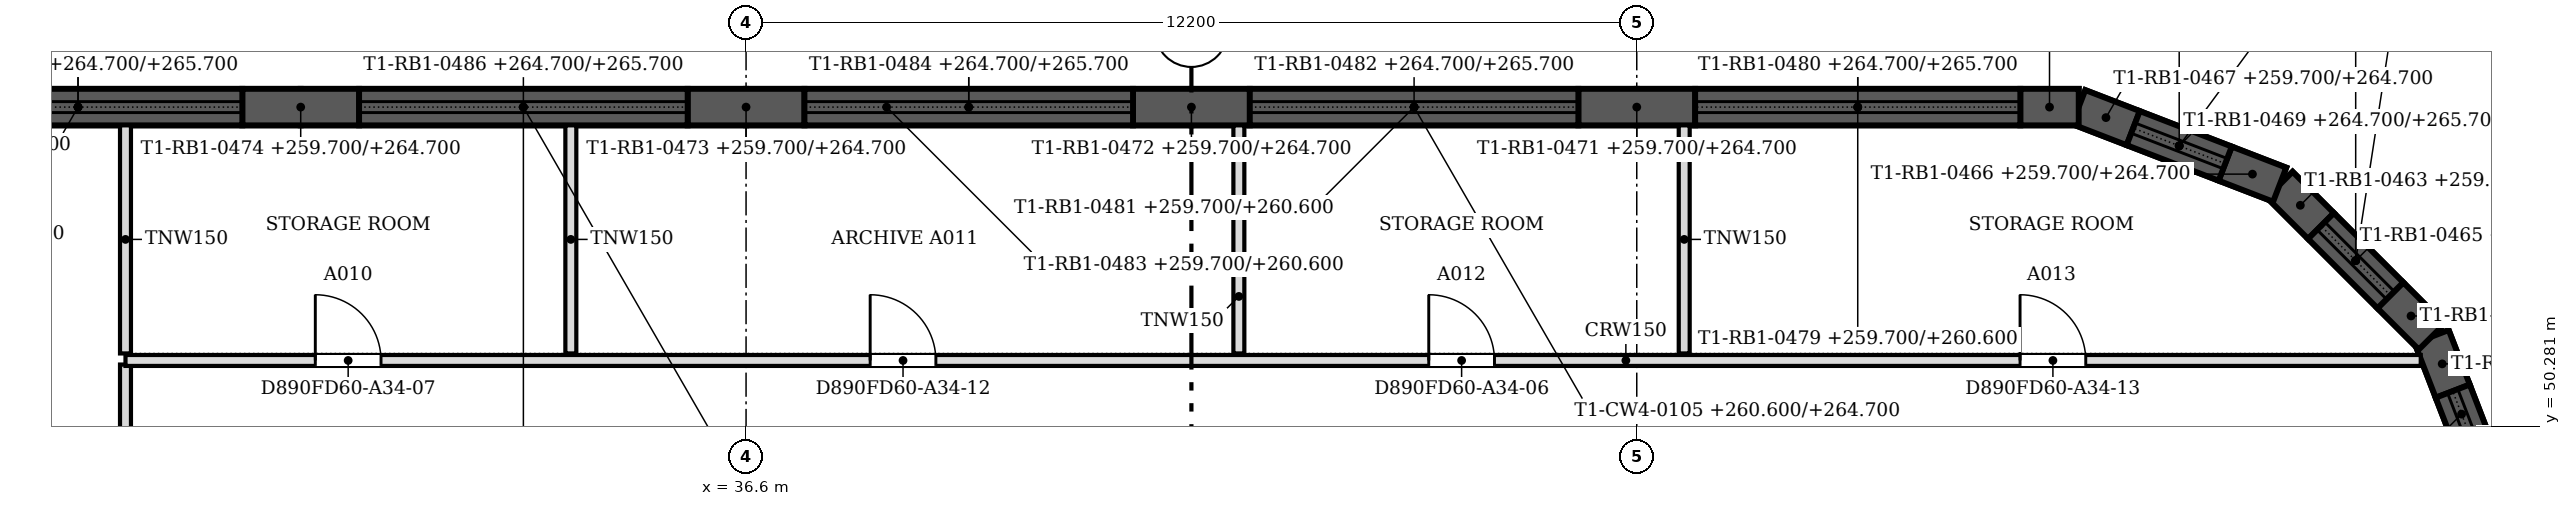
"""IFC4 building model, lengths in metres.
Left out: names, types, materials, properties, quantities, classifications, styles, units other than length and angle.
Written with IfcOpenShell. Run it as: python <this file> out.ifc"""

import sys

from ifc_helpers import new_model, si_unit, direction, frame, frame_2d, origin, place, context, subcontext, project, spatial, polyline, rectangle, outline, extrude, faceted_brep, source, transform, mapped, element, fill, save


model = new_model("IFC4")
c1 = context("Model", 3, precision=1e-05, world=origin(), true_north=direction((0.0, 1.0)))
c2 = subcontext(c1, "Body", "Model", "MODEL_VIEW")
j1 = project(units=[si_unit("LENGTHUNIT", "METRE"), si_unit("PLANEANGLEUNIT", "RADIAN")], contexts=[c1])
p1 = place(None, origin())
s1 = spatial("IfcSite", under=j1, at=p1, CompositionType="ELEMENT")
p2 = place(p1, origin())
s2 = spatial("IfcBuilding", under=s1, at=p2, CompositionType="ELEMENT")
p3 = place(p2, frame((0.0, 0.0, 259.7)))
s3 = spatial("IfcBuildingStorey", under=s2, at=p3, CompositionType="ELEMENT", Elevation=259.7)
m1 = source(origin(), c2, "Body", "Brep", [
    faceted_brep([(0.0, -0.25, 0.0), (0.8, -0.25, 0.0), (0.8, -0.25, 5.0), (0.0, -0.25, 5.0), (0.0, 0.25, 5.0), (0.747, 0.25, 5.0), (0.747, 0.25, 0.0), (0.0, 0.25, 0.0), (0.8, -0.0, 0.0), (0.8, -0.0, 5.0)], [[[0, 1, 2, 3]], [[4, 5, 6, 7]], [[7, 6, 8, 1, 0]], [[9, 2, 1, 8]], [[5, 4, 3, 2, 9]], [[4, 7, 0, 3]], [[8, 6, 5, 9]]]),
])
p4 = place(p3, frame((59.976, 50.76, 0.0), z_axis=(0.0, 0.0, 1.0), x_axis=(-0.360001058183, 0.932951894851, 0.0)))
e1 = element("IfcWall", 1, at=p4, inside=s3, PredefinedType="SOLIDWALL", context=c2, shape_type="MappedRepresentation", body=[
    mapped(m1, transform((0.0, 0.0, 0.0), scale=1.0)),
])
m2 = source(origin(), c2, "Body", "SweptSolid", [
    extrude(outline(polyline([(0.0, 0.0), (1.351, 0.0), (1.351, 0.9), (0.0, 0.9), (0.0, 0.0)])), frame((0.0, 0.25, 0.0), z_axis=(0.0, -1.0, 0.0), x_axis=(1.0, 0.0, 0.0)), (0.0, 0.0, 1.0), 0.5),
])
p5 = place(p3, frame((60.462, 49.5, 0.0), z_axis=(0.0, 0.0, 1.0), x_axis=(-0.359923772835, 0.932981713512, 0.0)))
e2 = element("IfcWall", 2, at=p5, inside=s3, PredefinedType="SOLIDWALL", context=c2, shape_type="MappedRepresentation", body=[
    mapped(m2, transform((0.0, 0.0, 0.0), scale=1.0)),
])
m3 = source(origin(), c2, "Body", "Brep", [
    faceted_brep([(0.0, -0.25, 0.0), (2.95, -0.25, 0.0), (2.95, -0.25, 1.0), (0.0, -0.25, 1.0), (0.047, 0.25, 1.0), (2.898, 0.25, 1.0), (2.898, 0.25, 0.0), (0.047, 0.25, 0.0), (2.95, 0.0, 0.0), (0.0, 0.0, 0.0), (2.95, 0.0, 1.0), (0.0, 0.0, 1.0)], [[[0, 1, 2, 3]], [[4, 5, 6, 7]], [[7, 6, 8, 1, 0, 9]], [[10, 2, 1, 8]], [[5, 4, 11, 3, 2, 10]], [[9, 0, 3, 11]], [[7, 9, 11, 4]], [[8, 6, 5, 10]]]),
])
p6 = place(p3, frame((60.75, 48.753, 5.0), z_axis=(0.0, 0.0, 1.0), x_axis=(-0.359877213415, 0.932999673775, 0.0)))
e3 = element("IfcWall", 3, at=p6, inside=s3, PredefinedType="SOLIDWALL", context=c2, shape_type="MappedRepresentation", body=[
    mapped(m3, transform((0.0, 0.0, 0.0), scale=1.0)),
])
m4 = source(origin(), c2, "Body", "Brep", [
    faceted_brep([(0.0, -0.25, 0.0), (0.8, -0.25, 0.0), (0.8, -0.25, 5.0), (0.0, -0.25, 5.0), (0.053, 0.25, 5.0), (0.8, 0.25, 5.0), (0.8, 0.25, 0.0), (0.053, 0.25, 0.0), (0.0, 0.0, 0.0), (0.0, 0.0, 5.0)], [[[0, 1, 2, 3]], [[4, 5, 6, 7]], [[7, 6, 1, 0, 8]], [[5, 4, 9, 3, 2]], [[8, 0, 3, 9]], [[7, 8, 9, 4]], [[1, 6, 5, 2]]]),
])
p7 = place(p3, frame((59.688, 51.506, 0.0), z_axis=(0.0, 0.0, 1.0), x_axis=(-0.707106781187, 0.707106781187, 0.0)))
e4 = element("IfcWall", 4, at=p7, inside=s3, PredefinedType="SOLIDWALL", context=c2, shape_type="MappedRepresentation", body=[
    mapped(m4, transform((0.0, 0.0, 0.0), scale=1.0)),
])
m5 = source(origin(), c2, "Body", "Brep", [
    faceted_brep([(0.0, -0.25, 0.0), (0.8, -0.25, 0.0), (0.8, -0.25, 5.0), (0.0, -0.25, 5.0), (0.0, 0.25, 5.0), (0.747, 0.25, 5.0), (0.747, 0.25, 0.0), (0.0, 0.25, 0.0), (0.8, -0.0, 0.0), (0.8, -0.0, 5.0)], [[[0, 1, 2, 3]], [[4, 5, 6, 7]], [[7, 6, 8, 1, 0]], [[9, 2, 1, 8]], [[5, 4, 3, 2, 9]], [[4, 7, 0, 3]], [[8, 6, 5, 9]]]),
])
p8 = place(p3, frame((58.172, 53.022, 0.0), z_axis=(0.0, 0.0, 1.0), x_axis=(-0.707106781187, 0.707106781187, 0.0)))
e5 = element("IfcWall", 5, at=p8, inside=s3, PredefinedType="SOLIDWALL", context=c2, shape_type="MappedRepresentation", body=[
    mapped(m5, transform((0.0, 0.0, 0.0), scale=1.0)),
])
m6 = source(origin(), c2, "Body", "SweptSolid", [
    extrude(outline(polyline([(0.0, 0.0), (1.344, 0.0), (1.344, 0.9), (0.0, 0.9), (0.0, 0.0)])), frame((0.0, 0.25, 0.0), z_axis=(0.0, -1.0, 0.0), x_axis=(1.0, 0.0, 0.0)), (0.0, 0.0, 1.0), 0.5),
])
p9 = place(p3, frame((59.122, 52.072, 0.0), z_axis=(0.0, 0.0, 1.0), x_axis=(-0.707106781187, 0.707106781187, 0.0)))
e6 = element("IfcWall", 6, at=p9, inside=s3, PredefinedType="SOLIDWALL", context=c2, shape_type="MappedRepresentation", body=[
    mapped(m6, transform((0.0, 0.0, 0.0), scale=1.0)),
])
m7 = source(origin(), c2, "Body", "Brep", [
    faceted_brep([(0.0, -0.25, 0.0), (2.944, -0.25, 0.0), (2.944, -0.25, 1.0), (0.0, -0.25, 1.0), (0.053, 0.25, 1.0), (2.891, 0.25, 1.0), (2.891, 0.25, 0.0), (0.053, 0.25, 0.0), (2.944, 0.0, 0.0), (0.0, 0.0, 0.0), (2.944, 0.0, 1.0), (0.0, 0.0, 1.0)], [[[0, 1, 2, 3]], [[4, 5, 6, 7]], [[7, 6, 8, 1, 0, 9]], [[10, 2, 1, 8]], [[5, 4, 11, 3, 2, 10]], [[9, 0, 3, 11]], [[7, 9, 11, 4]], [[8, 6, 5, 10]]]),
])
p10 = place(p3, frame((59.688, 51.506, 5.0), z_axis=(0.0, 0.0, 1.0), x_axis=(-0.707106781187, 0.707106781187, 0.0)))
e7 = element("IfcWall", 7, at=p10, inside=s3, PredefinedType="SOLIDWALL", context=c2, shape_type="MappedRepresentation", body=[
    mapped(m7, transform((0.0, 0.0, 0.0), scale=1.0)),
])
m8 = source(origin(), c2, "Body", "Brep", [
    faceted_brep([(0.0, -0.25, 0.0), (0.8, -0.25, 0.0), (0.8, -0.25, 5.0), (0.0, -0.25, 5.0), (0.053, 0.25, 5.0), (0.8, 0.25, 5.0), (0.8, 0.25, 0.0), (0.053, 0.25, 0.0), (0.0, 0.0, 0.0), (0.0, 0.0, 5.0)], [[[0, 1, 2, 3]], [[4, 5, 6, 7]], [[7, 6, 1, 0, 8]], [[5, 4, 9, 3, 2]], [[8, 0, 3, 9]], [[7, 8, 9, 4]], [[1, 6, 5, 2]]]),
])
p11 = place(p3, frame((57.606, 53.588, 0.0), z_axis=(0.0, 0.0, 1.0), x_axis=(-0.93301483327, 0.3598379092, 0.0)))
e8 = element("IfcWall", 8, at=p11, inside=s3, PredefinedType="SOLIDWALL", context=c2, shape_type="MappedRepresentation", body=[
    mapped(m8, transform((0.0, 0.0, 0.0), scale=1.0)),
])
m9 = source(origin(), c2, "Body", "Brep", [
    faceted_brep([(0.0, -0.25, 0.0), (0.8, -0.25, 0.0), (0.8, -0.25, 5.0), (0.0, -0.25, 5.0), (0.0, 0.25, 5.0), (0.753, 0.25, 5.0), (0.753, 0.25, 0.0), (0.0, 0.25, 0.0), (0.8, -0.0, 0.0), (0.8, -0.0, 5.0)], [[[0, 1, 2, 3]], [[4, 5, 6, 7]], [[7, 6, 8, 1, 0]], [[9, 2, 1, 8]], [[5, 4, 3, 2, 9]], [[4, 7, 0, 3]], [[8, 6, 5, 9]]]),
])
p12 = place(p3, frame((55.6, 54.362, 0.0), z_axis=(0.0, 0.0, 1.0), x_axis=(-0.93301483327, 0.3598379092, 0.0)))
e9 = element("IfcWall", 9, at=p12, inside=s3, PredefinedType="SOLIDWALL", context=c2, shape_type="MappedRepresentation", body=[
    mapped(m9, transform((0.0, 0.0, 0.0), scale=1.0)),
])
p13 = place(p3, frame((56.86, 53.876, 0.0), z_axis=(0.0, 0.0, 1.0), x_axis=(-0.932981713512, 0.359923772835, 0.0)))
e10 = element("IfcWall", 10, at=p13, inside=s3, PredefinedType="SOLIDWALL", context=c2, shape_type="MappedRepresentation", body=[
    mapped(m2, transform((0.0, 0.0, 0.0), scale=1.0)),
])
m10 = source(origin(), c2, "Body", "Brep", [
    faceted_brep([(0.0, -0.25, 0.0), (2.95, -0.25, 0.0), (2.95, -0.25, 1.0), (0.0, -0.25, 1.0), (0.053, 0.25, 1.0), (2.904, 0.25, 1.0), (2.904, 0.25, 0.0), (0.053, 0.25, 0.0), (2.95, 0.0, 0.0), (0.0, 0.0, 0.0), (2.95, 0.0, 1.0), (0.0, 0.0, 1.0)], [[[0, 1, 2, 3]], [[4, 5, 6, 7]], [[7, 6, 8, 1, 0, 9]], [[10, 2, 1, 8]], [[5, 4, 11, 3, 2, 10]], [[9, 0, 3, 11]], [[7, 9, 11, 4]], [[8, 6, 5, 10]]]),
])
p14 = place(p3, frame((57.606, 53.588, 5.0), z_axis=(0.0, 0.0, 1.0), x_axis=(-0.932999673775, 0.359877213415, 0.0)))
e11 = element("IfcWall", 11, at=p14, inside=s3, PredefinedType="SOLIDWALL", context=c2, shape_type="MappedRepresentation", body=[
    mapped(m10, transform((0.0, 0.0, 0.0), scale=1.0)),
])
m11 = source(origin(), c2, "Body", "Brep", [
    faceted_brep([(0.0, -0.25, 0.0), (0.8, -0.25, 0.0), (0.8, -0.25, 5.0), (0.0, -0.25, 5.0), (0.047, 0.25, 5.0), (0.8, 0.25, 5.0), (0.8, 0.25, 0.0), (0.047, 0.25, 0.0), (0.0, 0.0, 0.0), (0.0, 0.0, 5.0)], [[[0, 1, 2, 3]], [[4, 5, 6, 7]], [[7, 6, 1, 0, 8]], [[5, 4, 9, 3, 2]], [[8, 0, 3, 9]], [[7, 8, 9, 4]], [[1, 6, 5, 2]]]),
])
p15 = place(p3, frame((54.854, 54.65, 0.0), z_axis=(0.0, 0.0, 1.0), x_axis=(-1.0, 0.0, 0.0)))
e12 = element("IfcWall", 12, at=p15, inside=s3, PredefinedType="SOLIDWALL", context=c2, shape_type="MappedRepresentation", body=[
    mapped(m11, transform((0.0, 0.0, 0.0), scale=1.0)),
])
m12 = source(origin(), c2, "Body", "SweptSolid", [
    extrude(outline(polyline([(0.0, 0.0), (1.6, 0.0), (1.6, 5.0), (0.0, 5.0), (0.0, 0.0)])), frame((0.0, 0.25, 0.0), z_axis=(0.0, -1.0, 0.0), x_axis=(1.0, 0.0, 0.0)), (0.0, 0.0, 1.0), 0.5),
])
for number, where, z_axis, x_axis in (
    (13, (49.6, 54.65, 0.0), (0.0, 0.0, 1.0), (-1.0, 0.0, 0.0)),
    (14, (43.5, 54.65, 0.0), (0.0, 0.0, 1.0), (-1.0, 0.0, 0.0)),
):
    element("IfcWall", number, at=place(p3, frame(where, z_axis=z_axis, x_axis=x_axis)), inside=s3, PredefinedType="SOLIDWALL", context=c2, shape_type="MappedRepresentation", body=[
        mapped(m12, transform((0.0, 0.0, 0.0), scale=1.0)),
    ])
m13 = source(origin(), c2, "Body", "Brep", [
    faceted_brep([(0.0, -0.25, 0.0), (1.6, -0.25, 0.0), (1.6, -0.25, 5.0), (0.0, -0.25, 5.0), (0.0, 0.25, 5.0), (1.6, 0.25, 5.0), (1.6, 0.25, 0.0), (0.0, 0.25, 0.0)], [[[0, 1, 2, 3]], [[4, 5, 6, 7]], [[7, 6, 1, 0]], [[5, 4, 3, 2]], [[4, 7, 0, 3]], [[1, 6, 5, 2]]]),
])
p16 = place(p3, frame((37.4, 54.65, 0.0), z_axis=(0.0, 0.0, 1.0), x_axis=(-1.0, 0.0, 0.0)))
e15 = element("IfcWall", 15, at=p16, inside=s3, PredefinedType="SOLIDWALL", context=c2, shape_type="MappedRepresentation", body=[
    mapped(m13, transform((0.0, 0.0, 0.0), scale=1.0)),
])
p17 = place(p3, frame((31.3, 54.65, 0.0), z_axis=(0.0, 0.0, 1.0), x_axis=(-1.0, 0.0, 0.0)))
e16 = element("IfcWall", 16, at=p17, inside=s3, PredefinedType="SOLIDWALL", context=c2, shape_type="MappedRepresentation", body=[
    mapped(m12, transform((0.0, 0.0, 0.0), scale=1.0)),
])
m14 = source(origin(), c2, "Body", "SweptSolid", [
    extrude(outline(polyline([(0.0, 0.0), (4.453, 0.0), (4.453, 0.9), (0.0, 0.9), (0.0, 0.0)])), frame((0.0, 0.25, 0.0), z_axis=(0.0, -1.0, 0.0), x_axis=(1.0, 0.0, 0.0)), (0.0, 0.0, 1.0), 0.5),
])
p18 = place(p3, frame((54.053, 54.65, 0.0), z_axis=(0.0, 0.0, 1.0), x_axis=(-1.0, 0.0, 0.0)))
e17 = element("IfcWall", 17, at=p18, inside=s3, PredefinedType="SOLIDWALL", context=c2, shape_type="MappedRepresentation", body=[
    mapped(m14, transform((0.0, 0.0, 0.0), scale=1.0)),
])
m15 = source(origin(), c2, "Body", "Brep", [
    faceted_brep([(0.0, -0.25, 0.0), (6.053, -0.25, 0.0), (6.053, -0.25, 1.0), (0.0, -0.25, 1.0), (0.047, 0.25, 1.0), (6.053, 0.25, 1.0), (6.053, 0.25, 0.0), (0.047, 0.25, 0.0), (0.0, 0.0, 0.0), (0.0, 0.0, 1.0)], [[[0, 1, 2, 3]], [[4, 5, 6, 7]], [[7, 6, 1, 0, 8]], [[5, 4, 9, 3, 2]], [[8, 0, 3, 9]], [[7, 8, 9, 4]], [[1, 6, 5, 2]]]),
])
p19 = place(p3, frame((54.854, 54.65, 5.0), z_axis=(0.0, 0.0, 1.0), x_axis=(-1.0, 0.0, 0.0)))
e18 = element("IfcWall", 18, at=p19, inside=s3, PredefinedType="SOLIDWALL", context=c2, shape_type="MappedRepresentation", body=[
    mapped(m15, transform((0.0, 0.0, 0.0), scale=1.0)),
])
m16 = source(origin(), c2, "Body", "SweptSolid", [
    extrude(outline(polyline([(0.0, 0.0), (4.5, 0.0), (4.5, 0.9), (0.0, 0.9), (0.0, 0.0)])), frame((0.0, 0.25, 0.0), z_axis=(0.0, -1.0, 0.0), x_axis=(1.0, 0.0, 0.0)), (0.0, 0.0, 1.0), 0.5),
])
p20 = place(p3, frame((48.0, 54.65, 0.0), z_axis=(0.0, 0.0, 1.0), x_axis=(-1.0, 0.0, 0.0)))
e19 = element("IfcWall", 19, at=p20, inside=s3, PredefinedType="SOLIDWALL", context=c2, shape_type="MappedRepresentation", body=[
    mapped(m16, transform((0.0, 0.0, 0.0), scale=1.0)),
])
m17 = source(origin(), c2, "Body", "SweptSolid", [
    extrude(outline(polyline([(0.0, 0.0), (6.1, 0.0), (6.1, 1.0), (0.0, 1.0), (0.0, 0.0)])), frame((0.0, 0.25, 0.0), z_axis=(0.0, -1.0, 0.0), x_axis=(1.0, 0.0, 0.0)), (0.0, 0.0, 1.0), 0.5),
])
p21 = place(p3, frame((48.8, 54.65, 5.0), z_axis=(0.0, 0.0, 1.0), x_axis=(-1.0, 0.0, 0.0)))
e20 = element("IfcWall", 20, at=p21, inside=s3, PredefinedType="SOLIDWALL", context=c2, shape_type="MappedRepresentation", body=[
    mapped(m17, transform((0.0, 0.0, 0.0), scale=1.0)),
])
p22 = place(p3, frame((41.9, 54.65, 0.0), z_axis=(0.0, 0.0, 1.0), x_axis=(-1.0, 0.0, 0.0)))
e21 = element("IfcWall", 21, at=p22, inside=s3, PredefinedType="SOLIDWALL", context=c2, shape_type="MappedRepresentation", body=[
    mapped(m16, transform((0.0, 0.0, 0.0), scale=1.0)),
])
m18 = source(origin(), c2, "Body", "Brep", [
    faceted_brep([(0.0, -0.25, 0.0), (6.1, -0.25, 0.0), (6.1, -0.25, 1.0), (0.0, -0.25, 1.0), (0.0, 0.25, 1.0), (6.1, 0.25, 1.0), (6.1, 0.25, 0.0), (0.0, 0.25, 0.0)], [[[0, 1, 2, 3]], [[4, 5, 6, 7]], [[7, 6, 1, 0]], [[5, 4, 3, 2]], [[4, 7, 0, 3]], [[1, 6, 5, 2]]]),
])
p23 = place(p3, frame((42.7, 54.65, 5.0), z_axis=(0.0, 0.0, 1.0), x_axis=(-1.0, 0.0, 0.0)))
e22 = element("IfcWall", 22, at=p23, inside=s3, PredefinedType="SOLIDWALL", context=c2, shape_type="MappedRepresentation", body=[
    mapped(m18, transform((0.0, 0.0, 0.0), scale=1.0)),
])
p24 = place(p3, frame((35.8, 54.65, 0.0), z_axis=(0.0, 0.0, 1.0), x_axis=(-1.0, 0.0, 0.0)))
e23 = element("IfcWall", 23, at=p24, inside=s3, PredefinedType="SOLIDWALL", context=c2, shape_type="MappedRepresentation", body=[
    mapped(m16, transform((0.0, 0.0, 0.0), scale=1.0)),
])
p25 = place(p3, frame((36.6, 54.65, 5.0), z_axis=(0.0, 0.0, 1.0), x_axis=(-1.0, 0.0, 0.0)))
e24 = element("IfcWall", 24, at=p25, inside=s3, PredefinedType="SOLIDWALL", context=c2, shape_type="MappedRepresentation", body=[
    mapped(m17, transform((0.0, 0.0, 0.0), scale=1.0)),
])
p26 = place(p3, frame((29.7, 54.65, 0.0), z_axis=(0.0, 0.0, 1.0), x_axis=(-1.0, 0.0, 0.0)))
e25 = element("IfcWall", 25, at=p26, inside=s3, PredefinedType="SOLIDWALL", context=c2, shape_type="MappedRepresentation", body=[
    mapped(m16, transform((0.0, 0.0, 0.0), scale=1.0)),
])
p27 = place(p3, frame((30.5, 54.65, 5.0), z_axis=(0.0, 0.0, 1.0), x_axis=(-1.0, 0.0, 0.0)))
e26 = element("IfcWall", 26, at=p27, inside=s3, PredefinedType="SOLIDWALL", context=c2, shape_type="MappedRepresentation", body=[
    mapped(m17, transform((0.0, 0.0, 0.0), scale=1.0)),
])
p28 = place(p3, frame((28.1, 47.776, 0.0), z_axis=(0.0, 0.0, 1.0), x_axis=(0.0, 1.0, 0.0)))
e27 = element("IfcWall", 27, at=p28, inside=s3, PredefinedType="PARTITIONING", context=c2, shape_type="SweptSolid", body=[
    extrude(rectangle(XDim=3.348, YDim=0.15, at=frame_2d((1.674, 0.0))), origin(), (0.0, 0.0, 1.0), 5.167),
])
p29 = place(p3, frame((28.1, 51.18, 0.0), z_axis=(0.0, 0.0, 1.0), x_axis=(1.0, 0.0, 0.0)))
e28 = element("IfcWall", 28, at=p29, inside=s3, PredefinedType="PARTITIONING", context=c2, shape_type="SweptSolid", body=[
    extrude(rectangle(XDim=31.438, YDim=0.15, at=frame_2d((15.719, 0.0))), origin(), (0.0, 0.0, 1.0), 5.167),
])
m19 = source(origin(), c2, "Body", "SweptSolid", [
    extrude(rectangle(XDim=0.9, YDim=2.1, at=frame_2d((0.45, 1.05))), frame((0.0, 0.085, 0.0), z_axis=(0.0, -1.0, 0.0), x_axis=(1.0, 0.0, 0.0)), (0.0, 0.0, 1.0), 0.17),
])
p30 = place(p29, frame((17.851, 0.0, 0.0)))
e29 = element("IfcOpeningElement", 29, at=p30, cuts=e28, PredefinedType="OPENING", context=c2, shape_type="MappedRepresentation", body=[
    mapped(m19, transform((0.0, 0.0, 0.0), scale=1.0)),
])
p31 = place(p29, frame((2.6, 0.0, 0.0)))
e30 = element("IfcOpeningElement", 30, at=p31, cuts=e28, PredefinedType="OPENING", context=c2, shape_type="MappedRepresentation", body=[
    mapped(m19, transform((0.0, 0.0, 0.0), scale=1.0)),
])
p32 = place(p29, frame((10.2, 0.0, 0.0)))
e31 = element("IfcOpeningElement", 31, at=p32, cuts=e28, PredefinedType="OPENING", context=c2, shape_type="MappedRepresentation", body=[
    mapped(m19, transform((0.0, 0.0, 0.0), scale=1.0)),
])
p33 = place(p29, frame((25.95, 0.0, 0.0)))
e32 = element("IfcOpeningElement", 32, at=p33, cuts=e28, PredefinedType="OPENING", context=c2, shape_type="MappedRepresentation", body=[
    mapped(m19, transform((0.0, 0.0, 0.0), scale=1.0)),
])
for number, where, z_axis, x_axis in (
    (33, (28.1, 51.276, 0.0), (0.0, 0.0, 1.0), (0.0, 1.0, 0.0)),
    (34, (34.2, 51.276, 0.0), (0.0, 0.0, 1.0), (0.0, 1.0, 0.0)),
    (35, (43.35, 51.276, 0.0), (0.0, 0.0, 1.0), (0.0, 1.0, 0.0)),
    (36, (49.45, 51.276, 0.0), (0.0, 0.0, 1.0), (0.0, 1.0, 0.0)),
):
    element("IfcWall", number, at=place(p3, frame(where, z_axis=z_axis, x_axis=x_axis)), inside=s3, PredefinedType="PARTITIONING", context=c2, shape_type="SweptSolid", body=[
        extrude(rectangle(XDim=3.124, YDim=0.15, at=frame_2d((1.562, 0.0))), origin(), (0.0, 0.0, 1.0), 5.167),
    ])
m20 = source(origin(), c2, "Body", "SweptSolid", [
    extrude(rectangle(XDim=0.9, YDim=2.1, at=frame_2d((0.45, 1.05))), frame((0.0, 0.025, 0.0), z_axis=(0.0, -1.0, 0.0), x_axis=(1.0, 0.0, 0.0)), (0.0, 0.0, 1.0), 0.05),
])
p34 = place(p30, origin())
e37 = element("IfcDoor", 37, at=p34, inside=s3, OperationType="SINGLE_SWING_LEFT", PredefinedType="DOOR", context=c2, shape_type="MappedRepresentation", body=[
    mapped(m20, transform((0.0, 0.0, 0.0), scale=1.0)),
])
fill(e29, e37)
p35 = place(p31, origin())
e38 = element("IfcDoor", 38, at=p35, inside=s3, OperationType="SINGLE_SWING_LEFT", PredefinedType="DOOR", context=c2, shape_type="MappedRepresentation", body=[
    mapped(m20, transform((0.0, 0.0, 0.0), scale=1.0)),
])
fill(e30, e38)
p36 = place(p32, origin())
e39 = element("IfcDoor", 39, at=p36, inside=s3, OperationType="SINGLE_SWING_LEFT", PredefinedType="DOOR", context=c2, shape_type="MappedRepresentation", body=[
    mapped(m20, transform((0.0, 0.0, 0.0), scale=1.0)),
])
fill(e31, e39)
p37 = place(p33, origin())
e40 = element("IfcDoor", 40, at=p37, inside=s3, OperationType="SINGLE_SWING_LEFT", PredefinedType="DOOR", context=c2, shape_type="MappedRepresentation", body=[
    mapped(m20, transform((0.0, 0.0, 0.0), scale=1.0)),
])
fill(e32, e40)
save(model, sys.argv[1])
